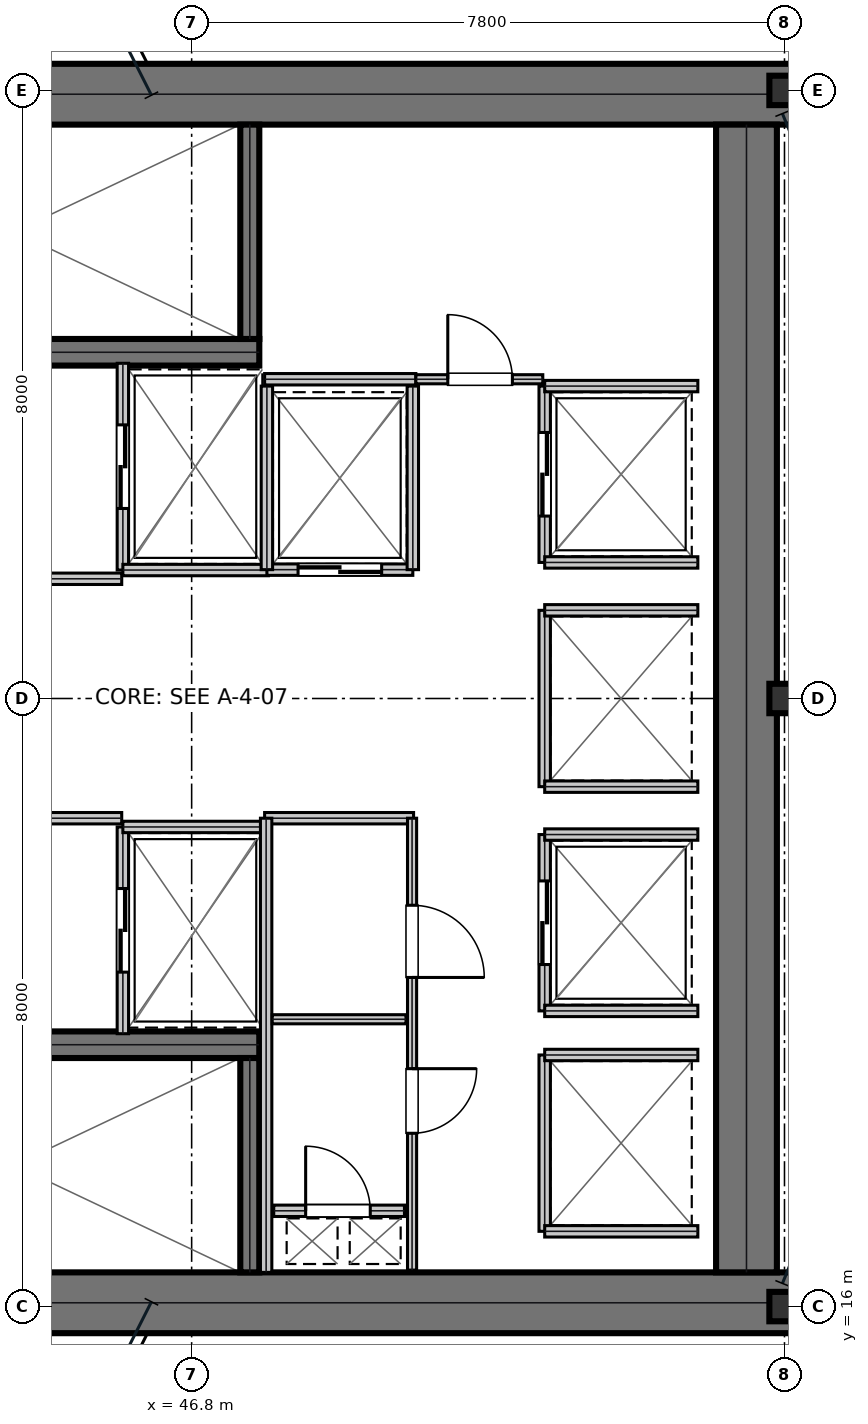
"""IFC4 building model, lengths in metres.
Left out: names, types, materials, properties, quantities, classifications, styles, units other than length and angle.
Written with IfcOpenShell. Run it as: python <this file> out.ifc"""

import sys

from ifc_helpers import new_model, si_unit, direction, frame, frame_2d, origin, origin_2d, place, context, subcontext, project, spatial, rectangle, i_section, extrude, element, fill, save


model = new_model("IFC4")
c1 = context("Model", 3, precision=1e-05, world=origin(), true_north=direction((0.0, 1.0)))
c2 = subcontext(c1, "Body", "Model", "MODEL_VIEW")
j1 = project(units=[si_unit("LENGTHUNIT", "METRE"), si_unit("PLANEANGLEUNIT", "RADIAN")], contexts=[c1])
p1 = place(None, origin())
s1 = spatial("IfcSite", under=j1, at=p1, CompositionType="ELEMENT")
p2 = place(p1, origin())
s2 = spatial("IfcBuilding", under=s1, at=p2, CompositionType="ELEMENT")
p3 = place(p2, frame((0.0, 0.0, 129.0)))
s3 = spatial("IfcBuildingStorey", under=s2, at=p3, CompositionType="ELEMENT", Elevation=129.0)
for number, where, z_axis, x_axis in (
    (1, (38.8, 31.95, 0.0), (0.0, 0.0, 1.0), (1.0, 0.0, 0.0)),
    (2, (38.8, 16.05, 0.0), (0.0, 0.0, 1.0), (1.0, 0.0, 0.0)),
):
    element("IfcWall", number, at=place(p3, frame(where, z_axis=z_axis, x_axis=x_axis)), inside=s3, PredefinedType="SHEAR", context=c2, shape_type="SweptSolid", body=[
        extrude(rectangle(XDim=16.0, YDim=0.8, at=frame_2d((8.0, 0.0))), origin(), (0.0, 0.0, 1.0), 3.81),
    ])
p4 = place(p3, frame((54.1, 16.45, 0.0), z_axis=(0.0, 0.0, 1.0), x_axis=(0.0, 1.0, 0.0)))
e3 = element("IfcWall", 3, at=p4, inside=s3, PredefinedType="SHEAR", context=c2, shape_type="SweptSolid", body=[
    extrude(rectangle(XDim=15.1, YDim=0.8, at=frame_2d((7.55, 0.0))), origin(), (0.0, 0.0, 1.0), 3.81),
])
p5 = place(p3, frame((39.98, 28.555, 0.0), z_axis=(0.0, 0.0, 1.0), x_axis=(1.0, 0.0, 0.0)))
e4 = element("IfcWall", 4, at=p5, inside=s3, PredefinedType="SHEAR", context=c2, shape_type="SweptSolid", body=[
    extrude(rectangle(XDim=7.71, YDim=0.35, at=frame_2d((3.855, 0.0))), origin(), (0.0, 0.0, 1.0), 3.81),
])
p6 = place(p5, frame((0.25, 0.0, 0.0)))
e5 = element("IfcOpeningElement", 5, at=p6, cuts=e4, PredefinedType="OPENING", context=c2, shape_type="SweptSolid", body=[
    extrude(rectangle(XDim=1.1, YDim=2.15, at=frame_2d((0.55, 1.075))), frame((0.0, 0.185, 0.0), z_axis=(0.0, -1.0, 0.0), x_axis=(1.0, 0.0, 0.0)), (0.0, 0.0, 1.0), 0.37),
])
p7 = place(p3, frame((39.98, 19.445, 0.0), z_axis=(0.0, 0.0, 1.0), x_axis=(1.0, 0.0, 0.0)))
e6 = element("IfcWall", 6, at=p7, inside=s3, PredefinedType="SHEAR", context=c2, shape_type="SweptSolid", body=[
    extrude(rectangle(XDim=7.71, YDim=0.35, at=frame_2d((3.855, 0.0))), origin(), (0.0, 0.0, 1.0), 3.81),
])
p8 = place(p7, frame((0.25, 0.0, 0.0)))
e7 = element("IfcOpeningElement", 7, at=p8, cuts=e6, PredefinedType="OPENING", context=c2, shape_type="SweptSolid", body=[
    extrude(rectangle(XDim=1.1, YDim=2.15, at=frame_2d((0.55, 1.075))), frame((0.0, 0.185, 0.0), z_axis=(0.0, -1.0, 0.0), x_axis=(1.0, 0.0, 0.0)), (0.0, 0.0, 1.0), 0.37),
])
for number, where, z_axis, x_axis in (
    (8, (47.565, 28.73, 0.0), (0.0, 0.0, 1.0), (0.0, 1.0, 0.0)),
    (9, (47.565, 16.45, 0.0), (0.0, 0.0, 1.0), (0.0, 1.0, 0.0)),
):
    element("IfcWall", number, at=place(p3, frame(where, z_axis=z_axis, x_axis=x_axis)), inside=s3, PredefinedType="SHEAR", context=c2, shape_type="SweptSolid", body=[
        extrude(rectangle(XDim=2.82, YDim=0.25, at=frame_2d((1.41, 0.0))), origin(), (0.0, 0.0, 1.0), 3.81),
    ])
for number, where, z_axis, x_axis in (
    (10, (54.6, 16.0, 0.0), (0.0, 0.0, 1.0), (1.0, 0.0, 0.0)),
    (11, (54.6, 24.0, 0.0), (0.0, 0.0, 1.0), (1.0, 0.0, 0.0)),
    (12, (54.6, 32.0, 0.0), (0.0, 0.0, 1.0), (1.0, 0.0, 0.0)),
):
    element("IfcColumn", number, at=place(p3, frame(where, z_axis=z_axis, x_axis=x_axis)), inside=s3, PredefinedType="COLUMN", context=c2, shape_type="SweptSolid", body=[
        extrude(i_section(OverallWidth=0.398, OverallDepth=0.387, WebThickness=0.021, FlangeThickness=0.033, at=origin_2d()), origin(), (0.0, 0.0, 1.0), 4.044),
    ])
p9 = place(p3, frame((39.98, 25.575, 0.0), z_axis=(0.0, 0.0, 1.0), x_axis=(1.0, 0.0, 0.0)))
e13 = element("IfcWall", 13, at=p9, inside=s3, PredefinedType="PARTITIONING", context=c2, shape_type="SweptSolid", body=[
    extrude(rectangle(XDim=5.9, YDim=0.15, at=frame_2d((2.95, 0.0))), origin(), (0.0, 0.0, 1.0), 3.81),
])
p10 = place(p9, frame((2.35, 0.0, 0.0)))
e14 = element("IfcOpeningElement", 14, at=p10, cuts=e13, PredefinedType="OPENING", context=c2, shape_type="SweptSolid", body=[
    extrude(rectangle(XDim=1.05, YDim=2.15, at=frame_2d((0.525, 1.075))), frame((0.0, 0.085, 0.0), z_axis=(0.0, -1.0, 0.0), x_axis=(1.0, 0.0, 0.0)), (0.0, 0.0, 1.0), 0.17),
])
p11 = place(p3, frame((39.98, 22.425, 0.0), z_axis=(0.0, 0.0, 1.0), x_axis=(1.0, 0.0, 0.0)))
e15 = element("IfcWall", 15, at=p11, inside=s3, PredefinedType="PARTITIONING", context=c2, shape_type="SweptSolid", body=[
    extrude(rectangle(XDim=5.9, YDim=0.15, at=frame_2d((2.95, 0.0))), origin(), (0.0, 0.0, 1.0), 3.81),
])
p12 = place(p11, frame((2.35, 0.0, 0.0)))
e16 = element("IfcOpeningElement", 16, at=p12, cuts=e15, PredefinedType="OPENING", context=c2, shape_type="SweptSolid", body=[
    extrude(rectangle(XDim=1.05, YDim=2.15, at=frame_2d((0.525, 1.075))), frame((0.0, 0.085, 0.0), z_axis=(0.0, -1.0, 0.0), x_axis=(1.0, 0.0, 0.0)), (0.0, 0.0, 1.0), 0.17),
])
p13 = place(p3, frame((45.895, 25.69, 0.0), z_axis=(0.0, 0.0, 1.0), x_axis=(0.0, 1.0, 0.0)))
e17 = element("IfcWall", 17, at=p13, inside=s3, PredefinedType="PARTITIONING", context=c2, shape_type="SweptSolid", body=[
    extrude(rectangle(XDim=2.72, YDim=0.15, at=frame_2d((1.36, 0.0))), origin(), (0.0, 0.0, 1.0), 3.81),
])
p14 = place(p13, frame((0.81, 0.0, 0.0)))
e18 = element("IfcOpeningElement", 18, at=p14, cuts=e17, PredefinedType="OPENING", context=c2, shape_type="SweptSolid", body=[
    extrude(rectangle(XDim=1.1, YDim=2.15, at=frame_2d((0.55, 1.075))), frame((0.0, 0.085, 0.0), z_axis=(0.0, -1.0, 0.0), x_axis=(1.0, 0.0, 0.0)), (0.0, 0.0, 1.0), 0.17),
])
p15 = place(p3, frame((45.895, 25.69, 0.0), z_axis=(0.0, 0.0, 1.0), x_axis=(1.0, 0.0, 0.0)))
e19 = element("IfcWall", 19, at=p15, inside=s3, PredefinedType="PARTITIONING", context=c2, shape_type="SweptSolid", body=[
    extrude(rectangle(XDim=1.915, YDim=0.15, at=frame_2d((0.958, 0.0))), origin(), (0.0, 0.0, 1.0), 3.81),
])
p16 = place(p3, frame((45.895, 19.59, 0.0), z_axis=(0.0, 0.0, 1.0), x_axis=(0.0, 1.0, 0.0)))
e20 = element("IfcWall", 20, at=p16, inside=s3, PredefinedType="PARTITIONING", context=c2, shape_type="SweptSolid", body=[
    extrude(rectangle(XDim=2.72, YDim=0.15, at=frame_2d((1.36, 0.0))), origin(), (0.0, 0.0, 1.0), 3.81),
])
p17 = place(p16, frame((0.81, 0.0, 0.0)))
e21 = element("IfcOpeningElement", 21, at=p17, cuts=e20, PredefinedType="OPENING", context=c2, shape_type="SweptSolid", body=[
    extrude(rectangle(XDim=1.1, YDim=2.15, at=frame_2d((0.55, 1.075))), frame((0.0, 0.085, 0.0), z_axis=(0.0, -1.0, 0.0), x_axis=(1.0, 0.0, 0.0)), (0.0, 0.0, 1.0), 0.17),
])
p18 = place(p3, frame((45.895, 22.31, 0.0), z_axis=(0.0, 0.0, 1.0), x_axis=(1.0, 0.0, 0.0)))
e22 = element("IfcWall", 22, at=p18, inside=s3, PredefinedType="PARTITIONING", context=c2, shape_type="SweptSolid", body=[
    extrude(rectangle(XDim=1.915, YDim=0.15, at=frame_2d((0.958, 0.0))), origin(), (0.0, 0.0, 1.0), 3.81),
])
p19 = place(p3, frame((47.79, 25.695, 0.0), z_axis=(0.0, 0.0, 1.0), x_axis=(1.0, 0.0, 0.0)))
e23 = element("IfcWall", 23, at=p19, inside=s3, PredefinedType="PARTITIONING", context=c2, shape_type="SweptSolid", body=[
    extrude(rectangle(XDim=1.92, YDim=0.15, at=frame_2d((0.96, 0.0))), origin(), (0.0, 0.0, 1.0), 3.81),
])
p20 = place(p19, frame((0.41, 0.0, 0.0)))
e24 = element("IfcOpeningElement", 24, at=p20, cuts=e23, PredefinedType="OPENING", context=c2, shape_type="SweptSolid", body=[
    extrude(rectangle(XDim=1.1, YDim=2.15, at=frame_2d((0.55, 1.075))), frame((0.0, 0.085, 0.0), z_axis=(0.0, -1.0, 0.0), x_axis=(1.0, 0.0, 0.0)), (0.0, 0.0, 1.0), 0.17),
])
for number, where, z_axis, x_axis in (
    (25, (47.79, 25.695, 0.0), (0.0, 0.0, 1.0), (0.0, 1.0, 0.0)),
    (26, (49.71, 25.695, 0.0), (0.0, 0.0, 1.0), (0.0, 1.0, 0.0)),
):
    element("IfcWall", number, at=place(p3, frame(where, z_axis=z_axis, x_axis=x_axis)), inside=s3, PredefinedType="PARTITIONING", context=c2, shape_type="SweptSolid", body=[
        extrude(rectangle(XDim=2.415, YDim=0.15, at=frame_2d((1.208, 0.0))), origin(), (0.0, 0.0, 1.0), 3.81),
    ])
p21 = place(p3, frame((51.445, 25.79, 0.0), z_axis=(0.0, 0.0, 1.0), x_axis=(0.0, 1.0, 0.0)))
e27 = element("IfcWall", 27, at=p21, inside=s3, PredefinedType="PARTITIONING", context=c2, shape_type="SweptSolid", body=[
    extrude(rectangle(XDim=2.32, YDim=0.15, at=frame_2d((1.16, 0.0))), origin(), (0.0, 0.0, 1.0), 3.81),
])
p22 = place(p21, frame((0.61, 0.0, 0.0)))
e28 = element("IfcOpeningElement", 28, at=p22, cuts=e27, PredefinedType="OPENING", context=c2, shape_type="SweptSolid", body=[
    extrude(rectangle(XDim=1.1, YDim=2.15, at=frame_2d((0.55, 1.075))), frame((0.0, 0.085, 0.0), z_axis=(0.0, -1.0, 0.0), x_axis=(1.0, 0.0, 0.0)), (0.0, 0.0, 1.0), 0.17),
])
for number, where, z_axis, x_axis in (
    (29, (51.445, 25.79, 0.0), (0.0, 0.0, 1.0), (1.0, 0.0, 0.0)),
    (30, (51.445, 28.11, 0.0), (0.0, 0.0, 1.0), (1.0, 0.0, 0.0)),
):
    element("IfcWall", number, at=place(p3, frame(where, z_axis=z_axis, x_axis=x_axis)), inside=s3, PredefinedType="PARTITIONING", context=c2, shape_type="SweptSolid", body=[
        extrude(rectangle(XDim=2.015, YDim=0.15, at=frame_2d((1.007, 0.0))), origin(), (0.0, 0.0, 1.0), 3.81),
    ])
p23 = place(p3, frame((51.445, 19.89, 0.0), z_axis=(0.0, 0.0, 1.0), x_axis=(0.0, 1.0, 0.0)))
e31 = element("IfcWall", 31, at=p23, inside=s3, PredefinedType="PARTITIONING", context=c2, shape_type="SweptSolid", body=[
    extrude(rectangle(XDim=2.32, YDim=0.15, at=frame_2d((1.16, 0.0))), origin(), (0.0, 0.0, 1.0), 3.81),
])
p24 = place(p23, frame((0.61, 0.0, 0.0)))
e32 = element("IfcOpeningElement", 32, at=p24, cuts=e31, PredefinedType="OPENING", context=c2, shape_type="SweptSolid", body=[
    extrude(rectangle(XDim=1.1, YDim=2.15, at=frame_2d((0.55, 1.075))), frame((0.0, 0.085, 0.0), z_axis=(0.0, -1.0, 0.0), x_axis=(1.0, 0.0, 0.0)), (0.0, 0.0, 1.0), 0.17),
])
for number, where, z_axis, x_axis in (
    (33, (51.445, 19.89, 0.0), (0.0, 0.0, 1.0), (1.0, 0.0, 0.0)),
    (34, (51.445, 22.21, 0.0), (0.0, 0.0, 1.0), (1.0, 0.0, 0.0)),
):
    element("IfcWall", number, at=place(p3, frame(where, z_axis=z_axis, x_axis=x_axis)), inside=s3, PredefinedType="PARTITIONING", context=c2, shape_type="SweptSolid", body=[
        extrude(rectangle(XDim=2.015, YDim=0.15, at=frame_2d((1.007, 0.0))), origin(), (0.0, 0.0, 1.0), 3.81),
    ])
p25 = place(p3, frame((51.445, 22.84, 0.0), z_axis=(0.0, 0.0, 1.0), x_axis=(0.0, 1.0, 0.0)))
e35 = element("IfcWall", 35, at=p25, inside=s3, PredefinedType="PARTITIONING", context=c2, shape_type="SweptSolid", body=[
    extrude(rectangle(XDim=2.32, YDim=0.15, at=frame_2d((1.16, 0.0))), origin(), (0.0, 0.0, 1.0), 3.81),
])
for number, where, z_axis, x_axis in (
    (36, (51.445, 22.84, 0.0), (0.0, 0.0, 1.0), (1.0, 0.0, 0.0)),
    (37, (51.445, 25.16, 0.0), (0.0, 0.0, 1.0), (1.0, 0.0, 0.0)),
):
    element("IfcWall", number, at=place(p3, frame(where, z_axis=z_axis, x_axis=x_axis)), inside=s3, PredefinedType="PARTITIONING", context=c2, shape_type="SweptSolid", body=[
        extrude(rectangle(XDim=2.015, YDim=0.15, at=frame_2d((1.007, 0.0))), origin(), (0.0, 0.0, 1.0), 3.81),
    ])
p26 = place(p3, frame((51.445, 16.99, 0.0), z_axis=(0.0, 0.0, 1.0), x_axis=(0.0, 1.0, 0.0)))
e38 = element("IfcWall", 38, at=p26, inside=s3, PredefinedType="PARTITIONING", context=c2, shape_type="SweptSolid", body=[
    extrude(rectangle(XDim=2.32, YDim=0.15, at=frame_2d((1.16, 0.0))), origin(), (0.0, 0.0, 1.0), 3.81),
])
for number, where, z_axis, x_axis in (
    (39, (51.445, 16.99, 0.0), (0.0, 0.0, 1.0), (1.0, 0.0, 0.0)),
    (40, (51.445, 19.31, 0.0), (0.0, 0.0, 1.0), (1.0, 0.0, 0.0)),
):
    element("IfcWall", number, at=place(p3, frame(where, z_axis=z_axis, x_axis=x_axis)), inside=s3, PredefinedType="PARTITIONING", context=c2, shape_type="SweptSolid", body=[
        extrude(rectangle(XDim=2.015, YDim=0.15, at=frame_2d((1.007, 0.0))), origin(), (0.0, 0.0, 1.0), 3.81),
    ])
p27 = place(p3, frame((47.88, 17.26, 0.0), z_axis=(0.0, 0.0, 1.0), x_axis=(1.0, 0.0, 0.0)))
e41 = element("IfcWall", 41, at=p27, inside=s3, PredefinedType="PARTITIONING", context=c2, shape_type="SweptSolid", body=[
    extrude(rectangle(XDim=1.72, YDim=0.15, at=frame_2d((0.86, 0.0))), origin(), (0.0, 0.0, 1.0), 3.81),
])
p28 = place(p27, frame((0.42, 0.0, 0.0)))
e42 = element("IfcOpeningElement", 42, at=p28, cuts=e41, PredefinedType="OPENING", context=c2, shape_type="SweptSolid", body=[
    extrude(rectangle(XDim=0.85, YDim=2.15, at=frame_2d((0.425, 1.075))), frame((0.0, 0.085, 0.0), z_axis=(0.0, -1.0, 0.0), x_axis=(1.0, 0.0, 0.0)), (0.0, 0.0, 1.0), 0.17),
])
p29 = place(p3, frame((47.76, 22.425, 0.0), z_axis=(0.0, 0.0, 1.0), x_axis=(1.0, 0.0, 0.0)))
e43 = element("IfcWall", 43, at=p29, inside=s3, PredefinedType="PARTITIONING", context=c2, shape_type="SweptSolid", body=[
    extrude(rectangle(XDim=1.96, YDim=0.15, at=frame_2d((0.98, 0.0))), origin(), (0.0, 0.0, 1.0), 3.81),
])
p30 = place(p3, frame((47.78, 16.45, 0.0), z_axis=(0.0, 0.0, 1.0), x_axis=(0.0, 1.0, 0.0)))
e44 = element("IfcWall", 44, at=p30, inside=s3, PredefinedType="PARTITIONING", context=c2, shape_type="SweptSolid", body=[
    extrude(rectangle(XDim=5.975, YDim=0.15, at=frame_2d((2.988, 0.0))), origin(), (0.0, 0.0, 1.0), 3.81),
])
p31 = place(p3, frame((47.86, 19.78, 0.0), z_axis=(0.0, 0.0, 1.0), x_axis=(1.0, 0.0, 0.0)))
e45 = element("IfcWall", 45, at=p31, inside=s3, PredefinedType="PARTITIONING", context=c2, shape_type="SweptSolid", body=[
    extrude(rectangle(XDim=1.76, YDim=0.12, at=frame_2d((0.88, 0.0))), origin(), (0.0, 0.0, 1.0), 3.81),
])
p32 = place(p3, frame((49.7, 16.48, 0.0), z_axis=(0.0, 0.0, 1.0), x_axis=(0.0, 1.0, 0.0)))
e46 = element("IfcWall", 46, at=p32, inside=s3, PredefinedType="PARTITIONING", context=c2, shape_type="SweptSolid", body=[
    extrude(rectangle(XDim=5.945, YDim=0.12, at=frame_2d((2.973, 0.0))), origin(), (0.0, 0.0, 1.0), 3.81),
])
p33 = place(p32, frame((1.8, 0.0, 0.0)))
e47 = element("IfcOpeningElement", 47, at=p33, cuts=e46, PredefinedType="OPENING", context=c2, shape_type="SweptSolid", body=[
    extrude(rectangle(XDim=0.85, YDim=2.15, at=frame_2d((0.425, 1.075))), frame((0.0, 0.07, 0.0), z_axis=(0.0, -1.0, 0.0), x_axis=(1.0, 0.0, 0.0)), (0.0, 0.0, 1.0), 0.14),
])
p34 = place(p32, frame((3.85, 0.0, 0.0)))
e48 = element("IfcOpeningElement", 48, at=p34, cuts=e46, PredefinedType="OPENING", context=c2, shape_type="SweptSolid", body=[
    extrude(rectangle(XDim=0.95, YDim=2.15, at=frame_2d((0.475, 1.075))), frame((0.0, 0.07, 0.0), z_axis=(0.0, -1.0, 0.0), x_axis=(1.0, 0.0, 0.0)), (0.0, 0.0, 1.0), 0.14),
])
p35 = place(p3, frame((47.76, 28.2, 0.0), z_axis=(0.0, 0.0, 1.0), x_axis=(1.0, 0.0, 0.0)))
e49 = element("IfcWall", 49, at=p35, inside=s3, PredefinedType="PARTITIONING", context=c2, shape_type="SweptSolid", body=[
    extrude(rectangle(XDim=1.99, YDim=0.15, at=frame_2d((0.995, 0.0))), origin(), (0.0, 0.0, 1.0), 3.81),
])
p36 = place(p3, frame((49.75, 28.2, 0.0), z_axis=(0.0, 0.0, 1.0), x_axis=(1.0, 0.0, 0.0)))
e50 = element("IfcWall", 50, at=p36, inside=s3, PredefinedType="PARTITIONING", context=c2, shape_type="SweptSolid", body=[
    extrude(rectangle(XDim=1.67, YDim=0.12, at=frame_2d((0.835, 0.0))), origin(), (0.0, 0.0, 1.0), 3.81),
])
p37 = place(p36, frame((0.42, 0.0, 0.0)))
e51 = element("IfcOpeningElement", 51, at=p37, cuts=e50, PredefinedType="OPENING", context=c2, shape_type="SweptSolid", body=[
    extrude(rectangle(XDim=0.85, YDim=2.15, at=frame_2d((0.425, 1.075))), frame((0.0, 0.07, 0.0), z_axis=(0.0, -1.0, 0.0), x_axis=(1.0, 0.0, 0.0)), (0.0, 0.0, 1.0), 0.14),
])
p38 = place(p14, frame((1.1, 0.0, 0.0), z_axis=(0.0, 0.0, 1.0), x_axis=(-1.0, 0.0, 0.0)))
e52 = element("IfcDoor", 52, at=p38, inside=s3, OperationType="DOUBLE_DOOR_SLIDING", PredefinedType="DOOR", context=c2, shape_type="SweptSolid", body=[
    extrude(rectangle(XDim=1.1, YDim=2.15, at=frame_2d((0.55, 1.075))), frame((0.0, 0.025, 0.0), z_axis=(0.0, -1.0, 0.0), x_axis=(1.0, 0.0, 0.0)), (0.0, 0.0, 1.0), 0.05),
])
fill(e18, e52)
p39 = place(p17, frame((1.1, 0.0, 0.0), z_axis=(0.0, 0.0, 1.0), x_axis=(-1.0, 0.0, 0.0)))
e53 = element("IfcDoor", 53, at=p39, inside=s3, OperationType="DOUBLE_DOOR_SLIDING", PredefinedType="DOOR", context=c2, shape_type="SweptSolid", body=[
    extrude(rectangle(XDim=1.1, YDim=2.15, at=frame_2d((0.55, 1.075))), frame((0.0, 0.025, 0.0), z_axis=(0.0, -1.0, 0.0), x_axis=(1.0, 0.0, 0.0)), (0.0, 0.0, 1.0), 0.05),
])
fill(e21, e53)
p40 = place(p20, frame((1.1, 0.0, 0.0), z_axis=(0.0, 0.0, 1.0), x_axis=(-1.0, 0.0, 0.0)))
e54 = element("IfcDoor", 54, at=p40, inside=s3, OperationType="DOUBLE_DOOR_SLIDING", PredefinedType="DOOR", context=c2, shape_type="SweptSolid", body=[
    extrude(rectangle(XDim=1.1, YDim=2.15, at=frame_2d((0.55, 1.075))), frame((0.0, 0.025, 0.0), z_axis=(0.0, -1.0, 0.0), x_axis=(1.0, 0.0, 0.0)), (0.0, 0.0, 1.0), 0.05),
])
fill(e24, e54)
p41 = place(p22, frame((1.1, 0.0, 0.0), z_axis=(0.0, 0.0, 1.0), x_axis=(-1.0, 0.0, 0.0)))
e55 = element("IfcDoor", 55, at=p41, inside=s3, OperationType="DOUBLE_DOOR_SLIDING", PredefinedType="DOOR", context=c2, shape_type="SweptSolid", body=[
    extrude(rectangle(XDim=1.1, YDim=2.15, at=frame_2d((0.55, 1.075))), frame((0.0, 0.025, 0.0), z_axis=(0.0, -1.0, 0.0), x_axis=(1.0, 0.0, 0.0)), (0.0, 0.0, 1.0), 0.05),
])
fill(e28, e55)
p42 = place(p24, frame((1.1, 0.0, 0.0), z_axis=(0.0, 0.0, 1.0), x_axis=(-1.0, 0.0, 0.0)))
e56 = element("IfcDoor", 56, at=p42, inside=s3, OperationType="DOUBLE_DOOR_SLIDING", PredefinedType="DOOR", context=c2, shape_type="SweptSolid", body=[
    extrude(rectangle(XDim=1.1, YDim=2.15, at=frame_2d((0.55, 1.075))), frame((0.0, 0.025, 0.0), z_axis=(0.0, -1.0, 0.0), x_axis=(1.0, 0.0, 0.0)), (0.0, 0.0, 1.0), 0.05),
])
fill(e32, e56)
p43 = place(p28, origin())
e57 = element("IfcDoor", 57, at=p43, inside=s3, OperationType="SINGLE_SWING_LEFT", PredefinedType="TRAPDOOR", context=c2, shape_type="SweptSolid", body=[
    extrude(rectangle(XDim=0.85, YDim=2.15, at=frame_2d((0.425, 1.075))), frame((0.0, 0.025, 0.0), z_axis=(0.0, -1.0, 0.0), x_axis=(1.0, 0.0, 0.0)), (0.0, 0.0, 1.0), 0.05),
])
fill(e42, e57)
p44 = place(p33, frame((0.85, 0.0, 0.0), z_axis=(0.0, 0.0, 1.0), x_axis=(-1.0, 0.0, 0.0)))
e58 = element("IfcDoor", 58, at=p44, inside=s3, OperationType="SINGLE_SWING_LEFT", PredefinedType="DOOR", context=c2, shape_type="SweptSolid", body=[
    extrude(rectangle(XDim=0.85, YDim=2.15, at=frame_2d((0.425, 1.075))), frame((0.0, 0.025, 0.0), z_axis=(0.0, -1.0, 0.0), x_axis=(1.0, 0.0, 0.0)), (0.0, 0.0, 1.0), 0.05),
])
fill(e47, e58)
p45 = place(p34, frame((0.95, 0.0, 0.0), z_axis=(0.0, 0.0, 1.0), x_axis=(-1.0, 0.0, 0.0)))
e59 = element("IfcDoor", 59, at=p45, inside=s3, OperationType="SINGLE_SWING_RIGHT", PredefinedType="DOOR", context=c2, shape_type="SweptSolid", body=[
    extrude(rectangle(XDim=0.95, YDim=2.15, at=frame_2d((0.475, 1.075))), frame((0.0, 0.025, 0.0), z_axis=(0.0, -1.0, 0.0), x_axis=(1.0, 0.0, 0.0)), (0.0, 0.0, 1.0), 0.05),
])
fill(e48, e59)
p46 = place(p37, origin())
e60 = element("IfcDoor", 60, at=p46, inside=s3, OperationType="SINGLE_SWING_LEFT", PredefinedType="DOOR", context=c2, shape_type="SweptSolid", body=[
    extrude(rectangle(XDim=0.85, YDim=2.15, at=frame_2d((0.425, 1.075))), frame((0.0, 0.025, 0.0), z_axis=(0.0, -1.0, 0.0), x_axis=(1.0, 0.0, 0.0)), (0.0, 0.0, 1.0), 0.05),
])
fill(e51, e60)
save(model, sys.argv[1])
